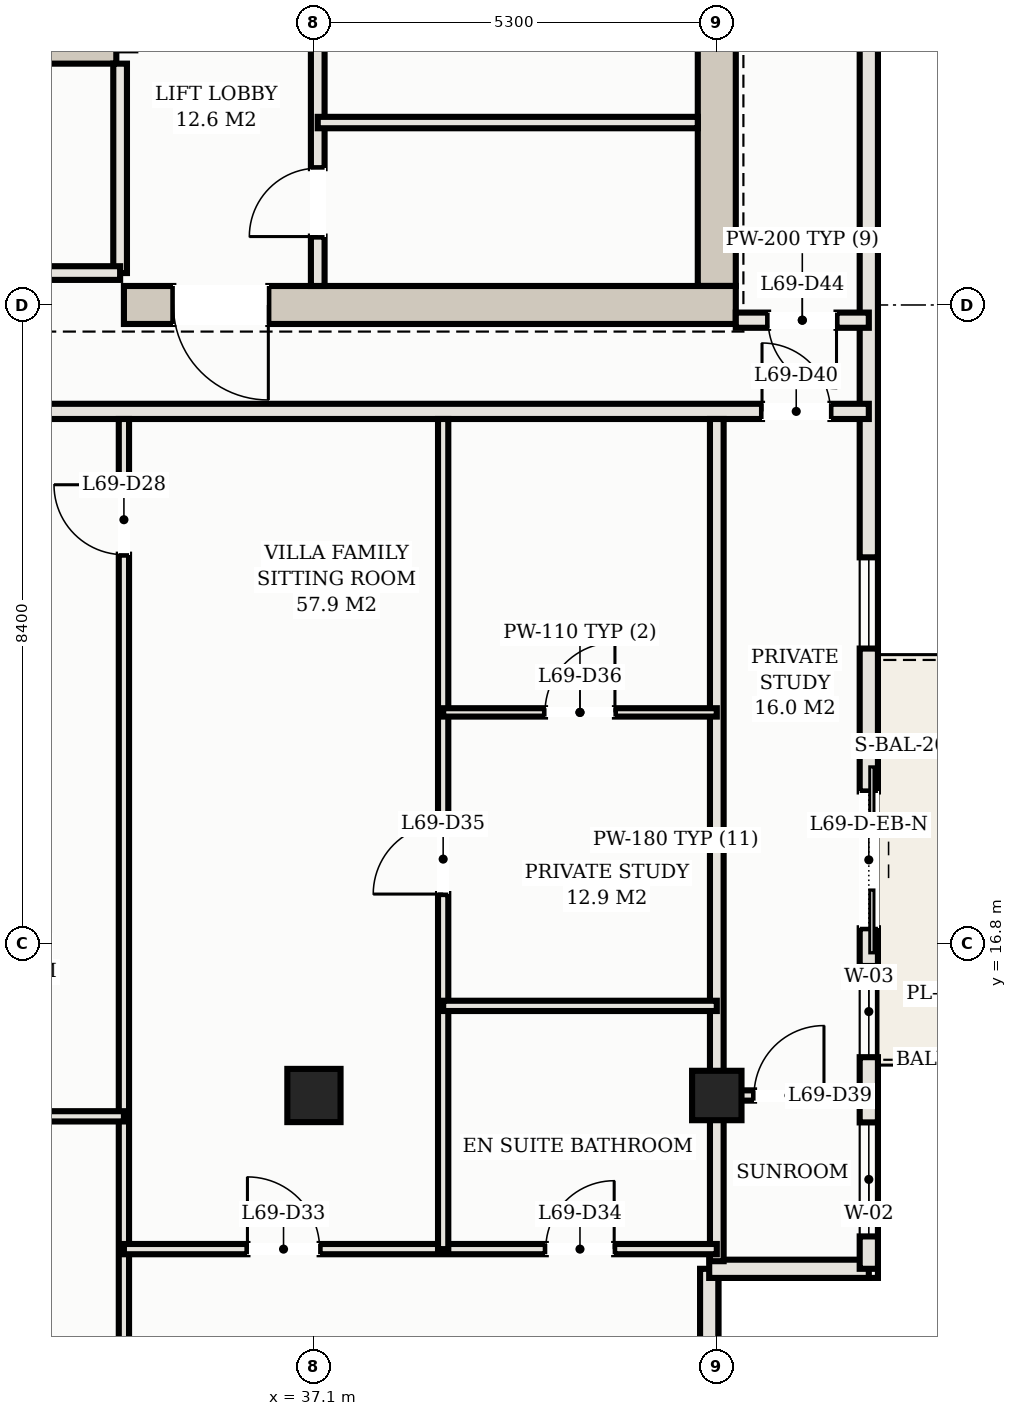
"""IFC4 building model, lengths in metres.
Left out: names, types, materials, properties, quantities, classifications, styles, units other than length and angle.
Written with IfcOpenShell. Run it as: python <this file> out.ifc"""

import sys

from ifc_helpers import new_model, si_unit, direction, frame, frame_2d, origin, origin_2d, place, context, subcontext, project, spatial, rectangle, hollow_rectangle, extrude, element, fill, save


model = new_model("IFC4")
c1 = context("Model", 3, precision=1e-05, world=origin(), true_north=direction((0.0, 1.0)))
c2 = subcontext(c1, "Body", "Model", "MODEL_VIEW")
j1 = project(units=[si_unit("LENGTHUNIT", "METRE"), si_unit("PLANEANGLEUNIT", "RADIAN")], contexts=[c1])
p1 = place(None, origin())
s1 = spatial("IfcSite", under=j1, at=p1, CompositionType="ELEMENT")
p2 = place(p1, origin())
s2 = spatial("IfcBuilding", under=s1, at=p2, CompositionType="ELEMENT")
p3 = place(p2, frame((0.0, 0.0, 249.5)))
s3 = spatial("IfcBuildingStorey", under=s2, at=p3, CompositionType="ELEMENT", Elevation=249.5)
p4 = place(p3, frame((42.4, 25.45, 0.0), z_axis=(0.0, 0.0, 1.0), x_axis=(0.0, 1.0, 0.0)))
e1 = element("IfcWall", 1, at=p4, inside=s3, PredefinedType="SHEAR", context=c2, shape_type="SweptSolid", body=[
    extrude(rectangle(XDim=14.3, YDim=0.5, at=frame_2d((7.15, 0.0))), origin(), (0.0, 0.0, 1.0), 3.11),
])
p5 = place(p3, frame((34.6, 25.2, 0.0), z_axis=(0.0, 0.0, 1.0), x_axis=(1.0, 0.0, 0.0)))
e2 = element("IfcWall", 2, at=p5, inside=s3, PredefinedType="SHEAR", context=c2, shape_type="SweptSolid", body=[
    extrude(rectangle(XDim=8.05, YDim=0.5, at=frame_2d((4.025, 0.0))), origin(), (0.0, 0.0, 1.0), 3.11),
])
p6 = place(p5, frame((0.65, 0.0, 0.0)))
e3 = element("IfcOpeningElement", 3, at=p6, cuts=e2, PredefinedType="OPENING", context=c2, shape_type="SweptSolid", body=[
    extrude(rectangle(XDim=1.25, YDim=2.2, at=frame_2d((0.625, 1.1))), frame((0.0, 0.26, 0.0), z_axis=(0.0, -1.0, 0.0), x_axis=(1.0, 0.0, 0.0)), (0.0, 0.0, 1.0), 0.52),
])
p7 = place(p3, frame((18.5, 28.55, 0.0), z_axis=(0.0, 0.0, 1.0), x_axis=(1.0, 0.0, 0.0)))
e4 = element("IfcWall", 4, at=p7, inside=s3, PredefinedType="SHEAR", context=c2, shape_type="SweptSolid", body=[
    extrude(rectangle(XDim=16.0, YDim=0.35, at=frame_2d((8.0, 0.0))), origin(), (0.0, 0.0, 1.0), 3.11),
])
p8 = place(p3, frame((37.1, 14.8, 0.0), z_axis=(0.0, 0.0, 1.0), x_axis=(1.0, 0.0, 0.0)))
e5 = element("IfcColumn", 5, at=p8, inside=s3, PredefinedType="COLUMN", context=c2, shape_type="SweptSolid", body=[
    extrude(hollow_rectangle(XDim=0.7, YDim=0.7, WallThickness=0.025, at=origin_2d()), origin(), (0.0, 0.0, 1.0), 3.3),
])
p9 = place(p3, frame((42.4, 14.8, 0.0), z_axis=(0.0, 0.0, 1.0), x_axis=(1.0, 0.0, 0.0)))
e6 = element("IfcColumn", 6, at=p9, inside=s3, PredefinedType="COLUMN", context=c2, shape_type="SweptSolid", body=[
    extrude(hollow_rectangle(XDim=0.65, YDim=0.65, WallThickness=0.022, at=origin_2d()), origin(), (0.0, 0.0, 1.0), 3.3),
])
p10 = place(p3, frame((42.3, 10.42, 0.0), z_axis=(0.0, 0.0, 1.0), x_axis=(0.0, 1.0, 0.0)))
e7 = element("IfcWall", 7, at=p10, inside=s3, PredefinedType="SOLIDWALL", context=c2, shape_type="SweptSolid", body=[
    extrude(rectangle(XDim=2.1, YDim=0.24, at=frame_2d((1.05, 0.0))), origin(), (0.0, 0.0, 1.0), 3.11),
])
p11 = place(p3, frame((42.3, 12.52, 0.0), z_axis=(0.0, 0.0, 1.0), x_axis=(1.0, 0.0, 0.0)))
e8 = element("IfcWall", 8, at=p11, inside=s3, PredefinedType="SOLIDWALL", context=c2, shape_type="SweptSolid", body=[
    extrude(rectangle(XDim=2.1, YDim=0.24, at=frame_2d((1.05, 0.0))), origin(), (0.0, 0.0, 1.0), 3.11),
])
p12 = place(p3, frame((44.4, 12.52, 0.0), z_axis=(0.0, 0.0, 1.0), x_axis=(0.0, 1.0, 0.0)))
e9 = element("IfcWall", 9, at=p12, inside=s3, PredefinedType="SOLIDWALL", context=c2, shape_type="SweptSolid", body=[
    extrude(rectangle(XDim=26.01, YDim=0.24, at=frame_2d((13.005, 0.0))), origin(), (0.0, 0.0, 1.0), 3.11),
])
p13 = place(p12, frame((4.48, 0.0, 0.0)))
e10 = element("IfcOpeningElement", 10, at=p13, cuts=e9, PredefinedType="OPENING", context=c2, shape_type="SweptSolid", body=[
    extrude(rectangle(XDim=1.8, YDim=2.2, at=frame_2d((0.9, 1.1))), frame((0.0, 0.13, 0.0), z_axis=(0.0, -1.0, 0.0), x_axis=(1.0, 0.0, 0.0)), (0.0, 0.0, 1.0), 0.26),
])
p14 = place(p12, frame((0.426, 0.0, 0.75)))
e11 = element("IfcOpeningElement", 11, at=p14, cuts=e9, PredefinedType="OPENING", context=c2, shape_type="SweptSolid", body=[
    extrude(rectangle(XDim=1.5, YDim=1.6, at=frame_2d((0.75, 0.8))), frame((0.0, 0.13, 0.0), z_axis=(0.0, -1.0, 0.0), x_axis=(1.0, 0.0, 0.0)), (0.0, 0.0, 1.0), 0.26),
])
p15 = place(p12, frame((2.784, 0.0, 0.75)))
e12 = element("IfcOpeningElement", 12, at=p15, cuts=e9, PredefinedType="OPENING", context=c2, shape_type="SweptSolid", body=[
    extrude(rectangle(XDim=1.2, YDim=1.5, at=frame_2d((0.6, 0.75))), frame((0.0, 0.13, 0.0), z_axis=(0.0, -1.0, 0.0), x_axis=(1.0, 0.0, 0.0)), (0.0, 0.0, 1.0), 0.26),
])
p16 = place(p12, frame((8.16, 0.0, 0.75)))
e13 = element("IfcOpeningElement", 13, at=p16, cuts=e9, PredefinedType="OPENING", context=c2, shape_type="SweptSolid", body=[
    extrude(rectangle(XDim=1.2, YDim=1.5, at=frame_2d((0.6, 0.75))), frame((0.0, 0.13, 0.0), z_axis=(0.0, -1.0, 0.0), x_axis=(1.0, 0.0, 0.0)), (0.0, 0.0, 1.0), 0.26),
])
p17 = place(p12, frame((16.296, 0.0, 0.75)))
e14 = element("IfcOpeningElement", 14, at=p17, cuts=e9, PredefinedType="OPENING", context=c2, shape_type="SweptSolid", body=[
    extrude(rectangle(XDim=1.2, YDim=1.5, at=frame_2d((0.6, 0.75))), frame((0.0, 0.13, 0.0), z_axis=(0.0, -1.0, 0.0), x_axis=(1.0, 0.0, 0.0)), (0.0, 0.0, 1.0), 0.26),
])
p18 = place(p12, frame((23.009, 0.0, 0.75)))
e15 = element("IfcOpeningElement", 15, at=p18, cuts=e9, PredefinedType="OPENING", context=c2, shape_type="SweptSolid", body=[
    extrude(rectangle(XDim=1.2, YDim=1.5, at=frame_2d((0.6, 0.75))), frame((0.0, 0.13, 0.0), z_axis=(0.0, -1.0, 0.0), x_axis=(1.0, 0.0, 0.0)), (0.0, 0.0, 1.0), 0.26),
])
p19 = place(p3, frame((37.15, 25.45, 0.0), z_axis=(0.0, 0.0, 1.0), x_axis=(0.0, 1.0, 0.0)))
e16 = element("IfcWall", 16, at=p19, inside=s3, PredefinedType="PARTITIONING", context=c2, shape_type="SweptSolid", body=[
    extrude(rectangle(XDim=5.475, YDim=0.18, at=frame_2d((2.738, 0.0))), origin(), (0.0, 0.0, 1.0), 2.45),
])
p20 = place(p19, frame((0.65, 0.0, 0.0)))
e17 = element("IfcOpeningElement", 17, at=p20, cuts=e16, PredefinedType="OPENING", context=c2, shape_type="SweptSolid", body=[
    extrude(rectangle(XDim=0.9, YDim=2.15, at=frame_2d((0.45, 1.075))), frame((0.0, 0.1, 0.0), z_axis=(0.0, -1.0, 0.0), x_axis=(1.0, 0.0, 0.0)), (0.0, 0.0, 1.0), 0.2),
])
p21 = place(p19, frame((3.327, 0.0, 0.0)))
e18 = element("IfcOpeningElement", 18, at=p21, cuts=e16, PredefinedType="OPENING", context=c2, shape_type="SweptSolid", body=[
    extrude(rectangle(XDim=0.92, YDim=2.15, at=frame_2d((0.46, 1.075))), frame((0.0, 0.1, 0.0), z_axis=(0.0, -1.0, 0.0), x_axis=(1.0, 0.0, 0.0)), (0.0, 0.0, 1.0), 0.2),
])
p22 = place(p3, frame((37.15, 27.6, 0.0), z_axis=(0.0, 0.0, 1.0), x_axis=(1.0, 0.0, 0.0)))
e19 = element("IfcWall", 19, at=p22, inside=s3, PredefinedType="PARTITIONING", context=c2, shape_type="SweptSolid", body=[
    extrude(rectangle(XDim=5.0, YDim=0.15, at=frame_2d((2.5, 0.0))), origin(), (0.0, 0.0, 1.0), 2.45),
])
p23 = place(p3, frame((34.55, 25.62, 0.0), z_axis=(0.0, 0.0, 1.0), x_axis=(0.0, 1.0, 0.0)))
e20 = element("IfcWall", 20, at=p23, inside=s3, PredefinedType="PARTITIONING", context=c2, shape_type="SweptSolid", body=[
    extrude(rectangle(XDim=2.755, YDim=0.18, at=frame_2d((1.377, 0.0))), origin(), (0.0, 0.0, 1.0), 2.45),
])
p24 = place(p3, frame((26.65, 25.62, 0.0), z_axis=(0.0, 0.0, 1.0), x_axis=(1.0, 0.0, 0.0)))
e21 = element("IfcWall", 21, at=p24, inside=s3, PredefinedType="PARTITIONING", context=c2, shape_type="SweptSolid", body=[
    extrude(rectangle(XDim=7.9, YDim=0.18, at=frame_2d((3.95, 0.0))), origin(), (0.0, 0.0, 1.0), 2.45),
])
p25 = place(p24, frame((3.34, 0.0, 0.0)))
e22 = element("IfcOpeningElement", 22, at=p25, cuts=e21, PredefinedType="OPENING", context=c2, shape_type="SweptSolid", body=[
    extrude(rectangle(XDim=0.92, YDim=2.15, at=frame_2d((0.46, 1.075))), frame((0.0, 0.1, 0.0), z_axis=(0.0, -1.0, 0.0), x_axis=(1.0, 0.0, 0.0)), (0.0, 0.0, 1.0), 0.2),
])
p26 = place(p3, frame((8.6, 23.8, 0.0), z_axis=(0.0, 0.0, 1.0), x_axis=(1.0, 0.0, 0.0)))
e23 = element("IfcWall", 23, at=p26, inside=s3, PredefinedType="PARTITIONING", context=c2, shape_type="SweptSolid", body=[
    extrude(rectangle(XDim=35.8, YDim=0.2, at=frame_2d((17.9, 0.0))), origin(), (0.0, 0.0, 1.0), 2.45),
])
p27 = place(p26, frame((2.75, 0.0, 0.0)))
e24 = element("IfcOpeningElement", 24, at=p27, cuts=e23, PredefinedType="OPENING", context=c2, shape_type="SweptSolid", body=[
    extrude(rectangle(XDim=1.1, YDim=2.25, at=frame_2d((0.55, 1.125))), frame((0.0, 0.11, 0.0), z_axis=(0.0, -1.0, 0.0), x_axis=(1.0, 0.0, 0.0)), (0.0, 0.0, 1.0), 0.22),
])
p28 = place(p26, frame((18.85, 0.0, 0.0)))
e25 = element("IfcOpeningElement", 25, at=p28, cuts=e23, PredefinedType="OPENING", context=c2, shape_type="SweptSolid", body=[
    extrude(rectangle(XDim=1.1, YDim=2.25, at=frame_2d((0.55, 1.125))), frame((0.0, 0.11, 0.0), z_axis=(0.0, -1.0, 0.0), x_axis=(1.0, 0.0, 0.0)), (0.0, 0.0, 1.0), 0.22),
])
p29 = place(p26, frame((0.505, 0.0, 0.0)))
e26 = element("IfcOpeningElement", 26, at=p29, cuts=e23, PredefinedType="OPENING", context=c2, shape_type="SweptSolid", body=[
    extrude(rectangle(XDim=0.9, YDim=2.15, at=frame_2d((0.45, 1.075))), frame((0.0, 0.11, 0.0), z_axis=(0.0, -1.0, 0.0), x_axis=(1.0, 0.0, 0.0)), (0.0, 0.0, 1.0), 0.22),
])
p30 = place(p26, frame((34.395, 0.0, 0.0)))
e27 = element("IfcOpeningElement", 27, at=p30, cuts=e23, PredefinedType="OPENING", context=c2, shape_type="SweptSolid", body=[
    extrude(rectangle(XDim=0.9, YDim=2.15, at=frame_2d((0.45, 1.075))), frame((0.0, 0.11, 0.0), z_axis=(0.0, -1.0, 0.0), x_axis=(1.0, 0.0, 0.0)), (0.0, 0.0, 1.0), 0.22),
])
p31 = place(p3, frame((42.65, 25.0, 0.0), z_axis=(0.0, 0.0, 1.0), x_axis=(1.0, 0.0, 0.0)))
e28 = element("IfcWall", 28, at=p31, inside=s3, PredefinedType="PARTITIONING", context=c2, shape_type="SweptSolid", body=[
    extrude(rectangle(XDim=1.75, YDim=0.2, at=frame_2d((0.875, 0.0))), origin(), (0.0, 0.0, 1.0), 2.45),
])
p32 = place(p31, frame((0.425, 0.0, 0.0)))
e29 = element("IfcOpeningElement", 29, at=p32, cuts=e28, PredefinedType="OPENING", context=c2, shape_type="SweptSolid", body=[
    extrude(rectangle(XDim=0.9, YDim=2.15, at=frame_2d((0.45, 1.075))), frame((0.0, 0.11, 0.0), z_axis=(0.0, -1.0, 0.0), x_axis=(1.0, 0.0, 0.0)), (0.0, 0.0, 1.0), 0.22),
])
p33 = place(p3, frame((42.4, 12.62, 0.0), z_axis=(0.0, 0.0, 1.0), x_axis=(0.0, 1.0, 0.0)))
e30 = element("IfcWall", 30, at=p33, inside=s3, PredefinedType="PARTITIONING", context=c2, shape_type="SweptSolid", body=[
    extrude(rectangle(XDim=11.08, YDim=0.18, at=frame_2d((5.54, 0.0))), origin(), (0.0, 0.0, 1.0), 2.45),
])
p34 = place(p3, frame((34.6, 8.42, 0.0), z_axis=(0.0, 0.0, 1.0), x_axis=(0.0, 1.0, 0.0)))
e31 = element("IfcWall", 31, at=p34, inside=s3, PredefinedType="PARTITIONING", context=c2, shape_type="SweptSolid", body=[
    extrude(rectangle(XDim=15.28, YDim=0.135, at=frame_2d((7.64, 0.0))), origin(), (0.0, 0.0, 1.0), 2.45),
])
p35 = place(p34, frame((13.495, 0.0, 0.0)))
e32 = element("IfcOpeningElement", 32, at=p35, cuts=e31, PredefinedType="OPENING", context=c2, shape_type="SweptSolid", body=[
    extrude(rectangle(XDim=0.92, YDim=2.15, at=frame_2d((0.46, 1.075))), frame((0.0, 0.078, 0.0), z_axis=(0.0, -1.0, 0.0), x_axis=(1.0, 0.0, 0.0)), (0.0, 0.0, 1.0), 0.155),
])
p36 = place(p3, frame((26.5, 14.526, 0.0), z_axis=(0.0, 0.0, 1.0), x_axis=(1.0, 0.0, 0.0)))
e33 = element("IfcWall", 33, at=p36, inside=s3, PredefinedType="PARTITIONING", context=c2, shape_type="SweptSolid", body=[
    extrude(rectangle(XDim=8.1, YDim=0.135, at=frame_2d((4.05, 0.0))), origin(), (0.0, 0.0, 1.0), 2.45),
])
p37 = place(p36, frame((0.815, 0.0, 0.0)))
e34 = element("IfcOpeningElement", 34, at=p37, cuts=e33, PredefinedType="OPENING", context=c2, shape_type="SweptSolid", body=[
    extrude(rectangle(XDim=0.92, YDim=2.15, at=frame_2d((0.46, 1.075))), frame((0.0, 0.078, 0.0), z_axis=(0.0, -1.0, 0.0), x_axis=(1.0, 0.0, 0.0)), (0.0, 0.0, 1.0), 0.155),
])
p38 = place(p3, frame((34.6, 12.779, 0.0), z_axis=(0.0, 0.0, 1.0), x_axis=(1.0, 0.0, 0.0)))
e35 = element("IfcWall", 35, at=p38, inside=s3, PredefinedType="PARTITIONING", context=c2, shape_type="SweptSolid", body=[
    extrude(rectangle(XDim=7.8, YDim=0.135, at=frame_2d((3.9, 0.0))), origin(), (0.0, 0.0, 1.0), 2.45),
])
p39 = place(p38, frame((1.625, 0.0, 0.0)))
e36 = element("IfcOpeningElement", 36, at=p39, cuts=e35, PredefinedType="OPENING", context=c2, shape_type="SweptSolid", body=[
    extrude(rectangle(XDim=0.95, YDim=2.15, at=frame_2d((0.475, 1.075))), frame((0.0, 0.078, 0.0), z_axis=(0.0, -1.0, 0.0), x_axis=(1.0, 0.0, 0.0)), (0.0, 0.0, 1.0), 0.155),
])
p40 = place(p38, frame((5.55, 0.0, 0.0)))
e37 = element("IfcOpeningElement", 37, at=p40, cuts=e35, PredefinedType="OPENING", context=c2, shape_type="SweptSolid", body=[
    extrude(rectangle(XDim=0.9, YDim=2.15, at=frame_2d((0.45, 1.075))), frame((0.0, 0.078, 0.0), z_axis=(0.0, -1.0, 0.0), x_axis=(1.0, 0.0, 0.0)), (0.0, 0.0, 1.0), 0.155),
])
p41 = place(p3, frame((38.8, 12.779, 0.0), z_axis=(0.0, 0.0, 1.0), x_axis=(0.0, 1.0, 0.0)))
e38 = element("IfcWall", 38, at=p41, inside=s3, PredefinedType="PARTITIONING", context=c2, shape_type="SweptSolid", body=[
    extrude(rectangle(XDim=10.921, YDim=0.135, at=frame_2d((5.46, 0.0))), origin(), (0.0, 0.0, 1.0), 2.45),
])
p42 = place(p41, frame((4.671, 0.0, 0.0)))
e39 = element("IfcOpeningElement", 39, at=p42, cuts=e38, PredefinedType="OPENING", context=c2, shape_type="SweptSolid", body=[
    extrude(rectangle(XDim=0.92, YDim=2.15, at=frame_2d((0.46, 1.075))), frame((0.0, 0.078, 0.0), z_axis=(0.0, -1.0, 0.0), x_axis=(1.0, 0.0, 0.0)), (0.0, 0.0, 1.0), 0.155),
])
p43 = place(p3, frame((38.8, 15.979, 0.0), z_axis=(0.0, 0.0, 1.0), x_axis=(1.0, 0.0, 0.0)))
e40 = element("IfcWall", 40, at=p43, inside=s3, PredefinedType="PARTITIONING", context=c2, shape_type="SweptSolid", body=[
    extrude(rectangle(XDim=3.6, YDim=0.135, at=frame_2d((1.8, 0.0))), origin(), (0.0, 0.0, 1.0), 2.45),
])
p44 = place(p3, frame((38.8, 19.84, 0.0), z_axis=(0.0, 0.0, 1.0), x_axis=(1.0, 0.0, 0.0)))
e41 = element("IfcWall", 41, at=p44, inside=s3, PredefinedType="MOVABLE", context=c2, shape_type="SweptSolid", body=[
    extrude(rectangle(XDim=3.6, YDim=0.11, at=frame_2d((1.8, 0.0))), origin(), (0.0, 0.0, 1.0), 2.45),
])
p45 = place(p44, frame((1.34, 0.0, 0.0)))
e42 = element("IfcOpeningElement", 42, at=p45, cuts=e41, PredefinedType="OPENING", context=c2, shape_type="SweptSolid", body=[
    extrude(rectangle(XDim=0.92, YDim=2.15, at=frame_2d((0.46, 1.075))), frame((0.0, 0.065, 0.0), z_axis=(0.0, -1.0, 0.0), x_axis=(1.0, 0.0, 0.0)), (0.0, 0.0, 1.0), 0.13),
])
p46 = place(p3, frame((42.4, 14.8, 0.0), z_axis=(0.0, 0.0, 1.0), x_axis=(1.0, 0.0, 0.0)))
e43 = element("IfcWall", 43, at=p46, inside=s3, PredefinedType="PARTITIONING", context=c2, shape_type="SweptSolid", body=[
    extrude(rectangle(XDim=1.9, YDim=0.135, at=frame_2d((0.95, 0.0))), origin(), (0.0, 0.0, 1.0), 2.45),
])
p47 = place(p46, frame((0.49, 0.0, 0.0)))
e44 = element("IfcOpeningElement", 44, at=p47, cuts=e43, PredefinedType="OPENING", context=c2, shape_type="SweptSolid", body=[
    extrude(rectangle(XDim=0.92, YDim=2.15, at=frame_2d((0.46, 1.075))), frame((0.0, 0.078, 0.0), z_axis=(0.0, -1.0, 0.0), x_axis=(1.0, 0.0, 0.0)), (0.0, 0.0, 1.0), 0.155),
])
p48 = place(p13, frame((1.8, 0.0, 0.0), z_axis=(0.0, 0.0, 1.0), x_axis=(-1.0, 0.0, 0.0)))
e45 = element("IfcDoor", 45, at=p48, inside=s3, OperationType="DOUBLE_DOOR_SLIDING", PredefinedType="DOOR", context=c2, shape_type="SweptSolid", body=[
    extrude(rectangle(XDim=1.8, YDim=2.2, at=frame_2d((0.9, 1.1))), frame((0.0, 0.025, 0.0), z_axis=(0.0, -1.0, 0.0), x_axis=(1.0, 0.0, 0.0)), (0.0, 0.0, 1.0), 0.05),
])
fill(e10, e45)
p49 = place(p14, origin())
e46 = element("IfcWindow", 46, at=p49, inside=s3, PartitioningType="SINGLE_PANEL", PredefinedType="WINDOW", context=c2, shape_type="SweptSolid", body=[
    extrude(rectangle(XDim=1.5, YDim=1.6, at=frame_2d((0.75, 0.8))), frame((0.0, 0.03, 0.0), z_axis=(0.0, -1.0, 0.0), x_axis=(1.0, 0.0, 0.0)), (0.0, 0.0, 1.0), 0.06),
])
fill(e11, e46)
p50 = place(p6, frame((1.25, 0.0, 0.0), z_axis=(0.0, 0.0, 1.0), x_axis=(-1.0, 0.0, 0.0)))
e47 = element("IfcDoor", 47, at=p50, inside=s3, OperationType="SINGLE_SWING_LEFT", PredefinedType="DOOR", context=c2, shape_type="SweptSolid", body=[
    extrude(rectangle(XDim=1.25, YDim=2.2, at=frame_2d((0.625, 1.1))), frame((0.0, 0.025, 0.0), z_axis=(0.0, -1.0, 0.0), x_axis=(1.0, 0.0, 0.0)), (0.0, 0.0, 1.0), 0.05),
])
fill(e3, e47)
p51 = place(p20, origin())
e48 = element("IfcDoor", 48, at=p51, inside=s3, OperationType="SINGLE_SWING_LEFT", PredefinedType="DOOR", context=c2, shape_type="SweptSolid", body=[
    extrude(rectangle(XDim=0.9, YDim=2.15, at=frame_2d((0.45, 1.075))), frame((0.0, 0.025, 0.0), z_axis=(0.0, -1.0, 0.0), x_axis=(1.0, 0.0, 0.0)), (0.0, 0.0, 1.0), 0.05),
])
fill(e17, e48)
p52 = place(p35, origin())
e49 = element("IfcDoor", 49, at=p52, inside=s3, OperationType="SINGLE_SWING_RIGHT", PredefinedType="DOOR", context=c2, shape_type="SweptSolid", body=[
    extrude(rectangle(XDim=0.92, YDim=2.15, at=frame_2d((0.46, 1.075))), frame((0.0, 0.025, 0.0), z_axis=(0.0, -1.0, 0.0), x_axis=(1.0, 0.0, 0.0)), (0.0, 0.0, 1.0), 0.05),
])
fill(e32, e49)
p53 = place(p39, origin())
e50 = element("IfcDoor", 50, at=p53, inside=s3, OperationType="SINGLE_SWING_LEFT", PredefinedType="DOOR", context=c2, shape_type="SweptSolid", body=[
    extrude(rectangle(XDim=0.95, YDim=2.15, at=frame_2d((0.475, 1.075))), frame((0.0, 0.025, 0.0), z_axis=(0.0, -1.0, 0.0), x_axis=(1.0, 0.0, 0.0)), (0.0, 0.0, 1.0), 0.05),
])
fill(e36, e50)
p54 = place(p40, origin())
e51 = element("IfcDoor", 51, at=p54, inside=s3, OperationType="SINGLE_SWING_RIGHT", PredefinedType="DOOR", context=c2, shape_type="SweptSolid", body=[
    extrude(rectangle(XDim=0.9, YDim=2.15, at=frame_2d((0.45, 1.075))), frame((0.0, 0.025, 0.0), z_axis=(0.0, -1.0, 0.0), x_axis=(1.0, 0.0, 0.0)), (0.0, 0.0, 1.0), 0.05),
])
fill(e37, e51)
p55 = place(p42, origin())
e52 = element("IfcDoor", 52, at=p55, inside=s3, OperationType="SINGLE_SWING_LEFT", PredefinedType="DOOR", context=c2, shape_type="SweptSolid", body=[
    extrude(rectangle(XDim=0.92, YDim=2.15, at=frame_2d((0.46, 1.075))), frame((0.0, 0.025, 0.0), z_axis=(0.0, -1.0, 0.0), x_axis=(1.0, 0.0, 0.0)), (0.0, 0.0, 1.0), 0.05),
])
fill(e39, e52)
p56 = place(p45, origin())
e53 = element("IfcDoor", 53, at=p56, inside=s3, OperationType="SINGLE_SWING_RIGHT", PredefinedType="DOOR", context=c2, shape_type="SweptSolid", body=[
    extrude(rectangle(XDim=0.92, YDim=2.15, at=frame_2d((0.46, 1.075))), frame((0.0, 0.025, 0.0), z_axis=(0.0, -1.0, 0.0), x_axis=(1.0, 0.0, 0.0)), (0.0, 0.0, 1.0), 0.05),
])
fill(e42, e53)
p57 = place(p47, origin())
e54 = element("IfcDoor", 54, at=p57, inside=s3, OperationType="SINGLE_SWING_RIGHT", PredefinedType="DOOR", context=c2, shape_type="SweptSolid", body=[
    extrude(rectangle(XDim=0.92, YDim=2.15, at=frame_2d((0.46, 1.075))), frame((0.0, 0.025, 0.0), z_axis=(0.0, -1.0, 0.0), x_axis=(1.0, 0.0, 0.0)), (0.0, 0.0, 1.0), 0.05),
])
fill(e44, e54)
p58 = place(p30, origin())
e55 = element("IfcDoor", 55, at=p58, inside=s3, OperationType="SINGLE_SWING_LEFT", PredefinedType="DOOR", context=c2, shape_type="SweptSolid", body=[
    extrude(rectangle(XDim=0.9, YDim=2.15, at=frame_2d((0.45, 1.075))), frame((0.0, 0.025, 0.0), z_axis=(0.0, -1.0, 0.0), x_axis=(1.0, 0.0, 0.0)), (0.0, 0.0, 1.0), 0.05),
])
fill(e27, e55)
p59 = place(p32, frame((0.9, 0.0, 0.0), z_axis=(0.0, 0.0, 1.0), x_axis=(-1.0, 0.0, 0.0)))
e56 = element("IfcDoor", 56, at=p59, inside=s3, OperationType="SINGLE_SWING_LEFT", PredefinedType="DOOR", context=c2, shape_type="SweptSolid", body=[
    extrude(rectangle(XDim=0.9, YDim=2.15, at=frame_2d((0.45, 1.075))), frame((0.0, 0.025, 0.0), z_axis=(0.0, -1.0, 0.0), x_axis=(1.0, 0.0, 0.0)), (0.0, 0.0, 1.0), 0.05),
])
fill(e29, e56)
p60 = place(p15, origin())
e57 = element("IfcWindow", 57, at=p60, inside=s3, PartitioningType="SINGLE_PANEL", PredefinedType="WINDOW", context=c2, shape_type="SweptSolid", body=[
    extrude(rectangle(XDim=1.2, YDim=1.5, at=frame_2d((0.6, 0.75))), frame((0.0, 0.03, 0.0), z_axis=(0.0, -1.0, 0.0), x_axis=(1.0, 0.0, 0.0)), (0.0, 0.0, 1.0), 0.06),
])
fill(e12, e57)
p61 = place(p16, origin())
e58 = element("IfcWindow", 58, at=p61, inside=s3, PartitioningType="SINGLE_PANEL", PredefinedType="WINDOW", context=c2, shape_type="SweptSolid", body=[
    extrude(rectangle(XDim=1.2, YDim=1.5, at=frame_2d((0.6, 0.75))), frame((0.0, 0.03, 0.0), z_axis=(0.0, -1.0, 0.0), x_axis=(1.0, 0.0, 0.0)), (0.0, 0.0, 1.0), 0.06),
])
fill(e13, e58)
save(model, sys.argv[1])
